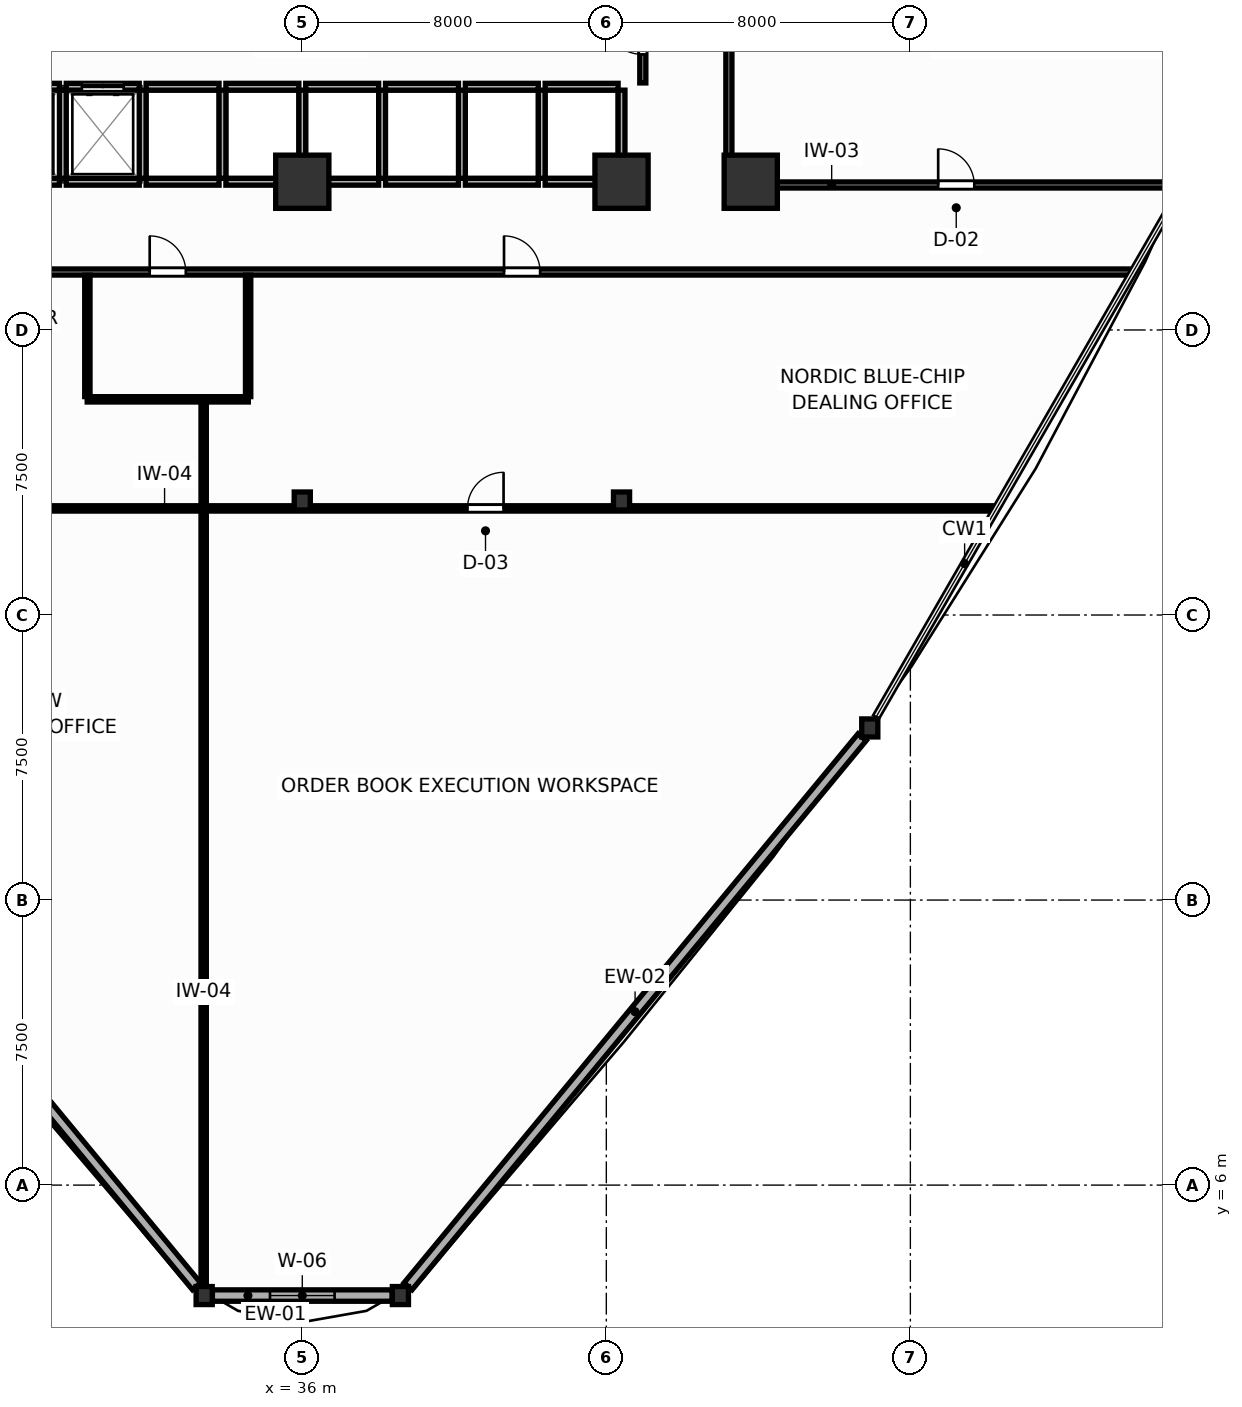
"""IFC4 building model, lengths in metres.
Left out: names, types, materials, properties, quantities, classifications, styles, units other than length and angle.
Written with IfcOpenShell. Run it as: python <this file> out.ifc"""

import sys

from ifc_helpers import new_model, si_unit, direction, frame, frame_2d, origin, origin_2d, place, context, subcontext, project, spatial, rectangle, i_section, extrude, source, transform, mapped, element, fill, save


model = new_model("IFC4")
c1 = context("Model", 3, precision=1e-05, world=origin(), true_north=direction((0.0, 1.0)))
c2 = subcontext(c1, "Body", "Model", "MODEL_VIEW")
j1 = project(units=[si_unit("LENGTHUNIT", "METRE"), si_unit("PLANEANGLEUNIT", "RADIAN")], contexts=[c1])
p1 = place(None, origin())
s1 = spatial("IfcSite", under=j1, at=p1, CompositionType="ELEMENT")
p2 = place(p1, origin())
s2 = spatial("IfcBuilding", under=s1, at=p2, CompositionType="ELEMENT")
p3 = place(p2, frame((0.0, 0.0, 31.8)))
s3 = spatial("IfcBuildingStorey", under=s2, at=p3, CompositionType="ELEMENT", Elevation=31.8)
m1 = source(origin(), c2, "Body", "SweptSolid", [
    extrude(rectangle(XDim=1.4, YDim=1.4, at=origin_2d()), origin(), (0.0, 0.0, 1.0), 3.9),
])
for number, where, z_axis, x_axis in (
    (1, (44.4, 32.4, 0.0), (0.0, 0.0, 1.0), (1.0, 0.0, 0.0)),
    (2, (36.0, 32.4, 0.0), (0.0, 0.0, 1.0), (1.0, 0.0, 0.0)),
    (3, (47.8, 32.4, 0.0), (0.0, 0.0, 1.0), (1.0, 0.0, 0.0)),
):
    element("IfcColumn", number, at=place(p3, frame(where, z_axis=z_axis, x_axis=x_axis)), inside=s3, PredefinedType="COLUMN", context=c2, shape_type="MappedRepresentation", body=[
        mapped(m1, transform((0.0, 0.0, 0.0), scale=1.0)),
    ])
m2 = source(origin(), c2, "Body", "SweptSolid", [
    extrude(i_section(OverallWidth=0.424, OverallDepth=0.474, WebThickness=0.045, FlangeThickness=0.072, FilletRadius=0.015, at=origin_2d()), origin(), (0.0, 0.0, 1.0), 3.9),
])
for number, where, z_axis, x_axis in (
    (4, (44.4, 24.0, 0.0), (0.0, 0.0, 1.0), (1.0, 0.0, 0.0)),
    (5, (36.0, 24.0, 0.0), (0.0, 0.0, 1.0), (1.0, 0.0, 0.0)),
    (6, (33.418, 3.094, 0.0), (0.0, 0.0, 1.0), (1.0, 0.0, 0.0)),
    (7, (38.582, 3.094, 0.0), (0.0, 0.0, 1.0), (1.0, 0.0, 0.0)),
    (8, (50.932, 18.029, 0.0), (0.0, 0.0, 1.0), (1.0, 0.0, 0.0)),
):
    element("IfcColumn", number, at=place(p3, frame(where, z_axis=z_axis, x_axis=x_axis)), inside=s3, PredefinedType="COLUMN", context=c2, shape_type="MappedRepresentation", body=[
        mapped(m2, transform((0.0, 0.0, 0.0), scale=1.0)),
    ])
p4 = place(p3, frame((21.268, 17.787, 0.0), z_axis=(0.0, 0.0, 1.0), x_axis=(0.637262575447, -0.770646747826, 0.0)))
e9 = element("IfcWall", 9, at=p4, inside=s3, PredefinedType="SOLIDWALL", context=c2, shape_type="SweptSolid", body=[
    extrude(rectangle(XDim=18.752, YDim=0.28, at=frame_2d((9.376, 0.0))), origin(), (0.0, 0.0, 1.0), 2.08),
])
p5 = place(p3, frame((33.635, 3.094, 0.0), z_axis=(0.0, 0.0, 1.0), x_axis=(1.0, 0.0, 0.0)))
e10 = element("IfcWall", 10, at=p5, inside=s3, PredefinedType="SOLIDWALL", context=c2, shape_type="SweptSolid", body=[
    extrude(rectangle(XDim=4.73, YDim=0.3, at=frame_2d((2.365, 0.0))), origin(), (0.0, 0.0, 1.0), 2.08),
])
p6 = place(p5, frame((1.515, 0.0, 0.75)))
e11 = element("IfcOpeningElement", 11, at=p6, cuts=e10, PredefinedType="OPENING", context=c2, shape_type="SweptSolid", body=[
    extrude(rectangle(XDim=1.7, YDim=1.15, at=frame_2d((0.85, 0.575))), frame((0.0, 0.16, 0.0), z_axis=(0.0, -1.0, 0.0), x_axis=(1.0, 0.0, 0.0)), (0.0, 0.0, 1.0), 0.32),
])
p7 = place(p3, frame((38.782, 3.336, 0.0), z_axis=(0.0, 0.0, 1.0), x_axis=(0.637262575447, 0.770646747826, 0.0)))
e12 = element("IfcWall", 12, at=p7, inside=s3, PredefinedType="SOLIDWALL", context=c2, shape_type="SweptSolid", body=[
    extrude(rectangle(XDim=18.752, YDim=0.28, at=frame_2d((9.376, 0.0))), origin(), (0.0, 0.0, 1.0), 2.08),
])
p8 = place(p3, frame((27.69, 34.9, 0.0), z_axis=(0.0, 0.0, 1.0), x_axis=(1.0, 0.0, 0.0)))
e13 = element("IfcWall", 13, at=p8, inside=s3, PredefinedType="PARTITIONING", context=c2, shape_type="SweptSolid", body=[
    extrude(rectangle(XDim=1.92, YDim=0.18, at=frame_2d((0.96, 0.0))), origin(), (0.0, 0.0, 1.0), 3.68),
])
p9 = place(p8, frame((0.41, 0.0, 0.0)))
e14 = element("IfcOpeningElement", 14, at=p9, cuts=e13, PredefinedType="OPENING", context=c2, shape_type="SweptSolid", body=[
    extrude(rectangle(XDim=1.1, YDim=2.1, at=frame_2d((0.55, 1.05))), frame((0.0, 0.1, 0.0), z_axis=(0.0, -1.0, 0.0), x_axis=(1.0, 0.0, 0.0)), (0.0, 0.0, 1.0), 0.2),
])
p10 = place(p3, frame((27.69, 32.4, 0.0), z_axis=(0.0, 0.0, 1.0), x_axis=(1.0, 0.0, 0.0)))
e15 = element("IfcWall", 15, at=p10, inside=s3, PredefinedType="PARTITIONING", context=c2, shape_type="SweptSolid", body=[
    extrude(rectangle(XDim=1.92, YDim=0.18, at=frame_2d((0.96, 0.0))), origin(), (0.0, 0.0, 1.0), 2.24),
])
p11 = place(p3, frame((29.79, 34.9, 0.0), z_axis=(0.0, 0.0, 1.0), x_axis=(1.0, 0.0, 0.0)))
e16 = element("IfcWall", 16, at=p11, inside=s3, PredefinedType="PARTITIONING", context=c2, shape_type="SweptSolid", body=[
    extrude(rectangle(XDim=1.92, YDim=0.18, at=frame_2d((0.96, 0.0))), origin(), (0.0, 0.0, 1.0), 3.68),
])
p12 = place(p11, frame((0.41, 0.0, 0.0)))
e17 = element("IfcOpeningElement", 17, at=p12, cuts=e16, PredefinedType="OPENING", context=c2, shape_type="SweptSolid", body=[
    extrude(rectangle(XDim=1.1, YDim=2.1, at=frame_2d((0.55, 1.05))), frame((0.0, 0.1, 0.0), z_axis=(0.0, -1.0, 0.0), x_axis=(1.0, 0.0, 0.0)), (0.0, 0.0, 1.0), 0.2),
])
p13 = place(p3, frame((29.79, 32.4, 0.0), z_axis=(0.0, 0.0, 1.0), x_axis=(1.0, 0.0, 0.0)))
e18 = element("IfcWall", 18, at=p13, inside=s3, PredefinedType="PARTITIONING", context=c2, shape_type="SweptSolid", body=[
    extrude(rectangle(XDim=1.92, YDim=0.18, at=frame_2d((0.96, 0.0))), origin(), (0.0, 0.0, 1.0), 2.24),
])
p14 = place(p3, frame((29.7, 32.49, 0.0), z_axis=(0.0, 0.0, 1.0), x_axis=(0.0, 1.0, 0.0)))
e19 = element("IfcWall", 19, at=p14, inside=s3, PredefinedType="PARTITIONING", context=c2, shape_type="SweptSolid", body=[
    extrude(rectangle(XDim=2.32, YDim=0.18, at=frame_2d((1.16, 0.0))), origin(), (0.0, 0.0, 1.0), 3.68),
])
p15 = place(p3, frame((31.89, 34.9, 0.0), z_axis=(0.0, 0.0, 1.0), x_axis=(1.0, 0.0, 0.0)))
e20 = element("IfcWall", 20, at=p15, inside=s3, PredefinedType="PARTITIONING", context=c2, shape_type="SweptSolid", body=[
    extrude(rectangle(XDim=1.92, YDim=0.18, at=frame_2d((0.96, 0.0))), origin(), (0.0, 0.0, 1.0), 3.68),
])
p16 = place(p3, frame((31.89, 32.4, 0.0), z_axis=(0.0, 0.0, 1.0), x_axis=(1.0, 0.0, 0.0)))
e21 = element("IfcWall", 21, at=p16, inside=s3, PredefinedType="PARTITIONING", context=c2, shape_type="SweptSolid", body=[
    extrude(rectangle(XDim=1.92, YDim=0.18, at=frame_2d((0.96, 0.0))), origin(), (0.0, 0.0, 1.0), 2.24),
])
p17 = place(p3, frame((31.8, 32.49, 0.0), z_axis=(0.0, 0.0, 1.0), x_axis=(0.0, 1.0, 0.0)))
e22 = element("IfcWall", 22, at=p17, inside=s3, PredefinedType="PARTITIONING", context=c2, shape_type="SweptSolid", body=[
    extrude(rectangle(XDim=2.32, YDim=0.18, at=frame_2d((1.16, 0.0))), origin(), (0.0, 0.0, 1.0), 3.68),
])
p18 = place(p3, frame((33.99, 34.9, 0.0), z_axis=(0.0, 0.0, 1.0), x_axis=(1.0, 0.0, 0.0)))
e23 = element("IfcWall", 23, at=p18, inside=s3, PredefinedType="PARTITIONING", context=c2, shape_type="SweptSolid", body=[
    extrude(rectangle(XDim=1.92, YDim=0.18, at=frame_2d((0.96, 0.0))), origin(), (0.0, 0.0, 1.0), 3.68),
])
p19 = place(p3, frame((33.99, 32.4, 0.0), z_axis=(0.0, 0.0, 1.0), x_axis=(1.0, 0.0, 0.0)))
e24 = element("IfcWall", 24, at=p19, inside=s3, PredefinedType="PARTITIONING", context=c2, shape_type="SweptSolid", body=[
    extrude(rectangle(XDim=1.92, YDim=0.18, at=frame_2d((0.96, 0.0))), origin(), (0.0, 0.0, 1.0), 2.24),
])
p20 = place(p3, frame((33.9, 32.49, 0.0), z_axis=(0.0, 0.0, 1.0), x_axis=(0.0, 1.0, 0.0)))
e25 = element("IfcWall", 25, at=p20, inside=s3, PredefinedType="PARTITIONING", context=c2, shape_type="SweptSolid", body=[
    extrude(rectangle(XDim=2.32, YDim=0.18, at=frame_2d((1.16, 0.0))), origin(), (0.0, 0.0, 1.0), 3.68),
])
p21 = place(p3, frame((36.09, 34.9, 0.0), z_axis=(0.0, 0.0, 1.0), x_axis=(1.0, 0.0, 0.0)))
e26 = element("IfcWall", 26, at=p21, inside=s3, PredefinedType="PARTITIONING", context=c2, shape_type="SweptSolid", body=[
    extrude(rectangle(XDim=1.92, YDim=0.18, at=frame_2d((0.96, 0.0))), origin(), (0.0, 0.0, 1.0), 3.68),
])
p22 = place(p3, frame((36.09, 32.4, 0.0), z_axis=(0.0, 0.0, 1.0), x_axis=(1.0, 0.0, 0.0)))
e27 = element("IfcWall", 27, at=p22, inside=s3, PredefinedType="PARTITIONING", context=c2, shape_type="SweptSolid", body=[
    extrude(rectangle(XDim=1.92, YDim=0.18, at=frame_2d((0.96, 0.0))), origin(), (0.0, 0.0, 1.0), 2.24),
])
p23 = place(p3, frame((36.0, 32.49, 0.0), z_axis=(0.0, 0.0, 1.0), x_axis=(0.0, 1.0, 0.0)))
e28 = element("IfcWall", 28, at=p23, inside=s3, PredefinedType="PARTITIONING", context=c2, shape_type="SweptSolid", body=[
    extrude(rectangle(XDim=2.32, YDim=0.18, at=frame_2d((1.16, 0.0))), origin(), (0.0, 0.0, 1.0), 3.68),
])
p24 = place(p3, frame((38.19, 34.9, 0.0), z_axis=(0.0, 0.0, 1.0), x_axis=(1.0, 0.0, 0.0)))
e29 = element("IfcWall", 29, at=p24, inside=s3, PredefinedType="PARTITIONING", context=c2, shape_type="SweptSolid", body=[
    extrude(rectangle(XDim=1.92, YDim=0.18, at=frame_2d((0.96, 0.0))), origin(), (0.0, 0.0, 1.0), 3.68),
])
p25 = place(p3, frame((38.19, 32.4, 0.0), z_axis=(0.0, 0.0, 1.0), x_axis=(1.0, 0.0, 0.0)))
e30 = element("IfcWall", 30, at=p25, inside=s3, PredefinedType="PARTITIONING", context=c2, shape_type="SweptSolid", body=[
    extrude(rectangle(XDim=1.92, YDim=0.18, at=frame_2d((0.96, 0.0))), origin(), (0.0, 0.0, 1.0), 2.24),
])
p26 = place(p3, frame((38.1, 32.49, 0.0), z_axis=(0.0, 0.0, 1.0), x_axis=(0.0, 1.0, 0.0)))
e31 = element("IfcWall", 31, at=p26, inside=s3, PredefinedType="PARTITIONING", context=c2, shape_type="SweptSolid", body=[
    extrude(rectangle(XDim=2.32, YDim=0.18, at=frame_2d((1.16, 0.0))), origin(), (0.0, 0.0, 1.0), 3.68),
])
p27 = place(p3, frame((40.29, 34.9, 0.0), z_axis=(0.0, 0.0, 1.0), x_axis=(1.0, 0.0, 0.0)))
e32 = element("IfcWall", 32, at=p27, inside=s3, PredefinedType="PARTITIONING", context=c2, shape_type="SweptSolid", body=[
    extrude(rectangle(XDim=1.92, YDim=0.18, at=frame_2d((0.96, 0.0))), origin(), (0.0, 0.0, 1.0), 3.68),
])
p28 = place(p3, frame((40.29, 32.4, 0.0), z_axis=(0.0, 0.0, 1.0), x_axis=(1.0, 0.0, 0.0)))
e33 = element("IfcWall", 33, at=p28, inside=s3, PredefinedType="PARTITIONING", context=c2, shape_type="SweptSolid", body=[
    extrude(rectangle(XDim=1.92, YDim=0.18, at=frame_2d((0.96, 0.0))), origin(), (0.0, 0.0, 1.0), 2.24),
])
p29 = place(p3, frame((40.2, 32.49, 0.0), z_axis=(0.0, 0.0, 1.0), x_axis=(0.0, 1.0, 0.0)))
e34 = element("IfcWall", 34, at=p29, inside=s3, PredefinedType="PARTITIONING", context=c2, shape_type="SweptSolid", body=[
    extrude(rectangle(XDim=2.32, YDim=0.18, at=frame_2d((1.16, 0.0))), origin(), (0.0, 0.0, 1.0), 3.68),
])
p30 = place(p3, frame((42.39, 34.9, 0.0), z_axis=(0.0, 0.0, 1.0), x_axis=(1.0, 0.0, 0.0)))
e35 = element("IfcWall", 35, at=p30, inside=s3, PredefinedType="PARTITIONING", context=c2, shape_type="SweptSolid", body=[
    extrude(rectangle(XDim=1.92, YDim=0.18, at=frame_2d((0.96, 0.0))), origin(), (0.0, 0.0, 1.0), 3.68),
])
p31 = place(p3, frame((42.39, 32.4, 0.0), z_axis=(0.0, 0.0, 1.0), x_axis=(1.0, 0.0, 0.0)))
e36 = element("IfcWall", 36, at=p31, inside=s3, PredefinedType="PARTITIONING", context=c2, shape_type="SweptSolid", body=[
    extrude(rectangle(XDim=1.92, YDim=0.18, at=frame_2d((0.96, 0.0))), origin(), (0.0, 0.0, 1.0), 2.24),
])
for number, where, z_axis, x_axis in (
    (37, (42.3, 32.49, 0.0), (0.0, 0.0, 1.0), (0.0, 1.0, 0.0)),
    (38, (44.4, 32.49, 0.0), (0.0, 0.0, 1.0), (0.0, 1.0, 0.0)),
):
    element("IfcWall", number, at=place(p3, frame(where, z_axis=z_axis, x_axis=x_axis)), inside=s3, PredefinedType="PARTITIONING", context=c2, shape_type="SweptSolid", body=[
        extrude(rectangle(XDim=2.32, YDim=0.18, at=frame_2d((1.16, 0.0))), origin(), (0.0, 0.0, 1.0), 3.68),
    ])
p32 = place(p3, frame((44.96, 35.0, 0.0), z_axis=(0.0, 0.0, 1.0), x_axis=(0.0, 1.0, 0.0)))
e39 = element("IfcWall", 39, at=p32, inside=s3, PredefinedType="PARTITIONING", context=c2, shape_type="SweptSolid", body=[
    extrude(rectangle(XDim=2.65, YDim=0.16, at=frame_2d((1.325, 0.0))), origin(), (0.0, 0.0, 1.0), 3.68),
])
p33 = place(p32, frame((0.75, 0.0, 0.0)))
e40 = element("IfcOpeningElement", 40, at=p33, cuts=e39, PredefinedType="OPENING", context=c2, shape_type="SweptSolid", body=[
    extrude(rectangle(XDim=1.05, YDim=2.1, at=frame_2d((0.525, 1.05))), frame((0.0, 0.09, 0.0), z_axis=(0.0, -1.0, 0.0), x_axis=(1.0, 0.0, 0.0)), (0.0, 0.0, 1.0), 0.18),
])
p34 = place(p3, frame((14.162, 30.025, 0.0), z_axis=(0.0, 0.0, 1.0), x_axis=(1.0, 0.0, 0.0)))
e41 = element("IfcWall", 41, at=p34, inside=s3, PredefinedType="PARTITIONING", context=c2, shape_type="SweptSolid", body=[
    extrude(rectangle(XDim=43.676, YDim=0.16, at=frame_2d((21.838, 0.0))), origin(), (0.0, 0.0, 1.0), 3.68),
])
p35 = place(p34, frame((17.823, 0.0, 0.0)))
e42 = element("IfcOpeningElement", 42, at=p35, cuts=e41, PredefinedType="OPENING", context=c2, shape_type="SweptSolid", body=[
    extrude(rectangle(XDim=0.95, YDim=2.05, at=frame_2d((0.475, 1.025))), frame((0.0, 0.09, 0.0), z_axis=(0.0, -1.0, 0.0), x_axis=(1.0, 0.0, 0.0)), (0.0, 0.0, 1.0), 0.18),
])
p36 = place(p34, frame((6.824, 0.0, 0.0)))
e43 = element("IfcOpeningElement", 43, at=p36, cuts=e41, PredefinedType="OPENING", context=c2, shape_type="SweptSolid", body=[
    extrude(rectangle(XDim=0.95, YDim=2.05, at=frame_2d((0.475, 1.025))), frame((0.0, 0.09, 0.0), z_axis=(0.0, -1.0, 0.0), x_axis=(1.0, 0.0, 0.0)), (0.0, 0.0, 1.0), 0.18),
])
p37 = place(p34, frame((27.146, 0.0, 0.0)))
e44 = element("IfcOpeningElement", 44, at=p37, cuts=e41, PredefinedType="OPENING", context=c2, shape_type="SweptSolid", body=[
    extrude(rectangle(XDim=0.95, YDim=2.05, at=frame_2d((0.475, 1.025))), frame((0.0, 0.09, 0.0), z_axis=(0.0, -1.0, 0.0), x_axis=(1.0, 0.0, 0.0)), (0.0, 0.0, 1.0), 0.18),
])
p38 = place(p3, frame((47.225, 32.31, 0.0), z_axis=(0.0, 0.0, 1.0), x_axis=(0.0, 1.0, 0.0)))
e45 = element("IfcWall", 45, at=p38, inside=s3, PredefinedType="PARTITIONING", context=c2, shape_type="SweptSolid", body=[
    extrude(rectangle(XDim=25.059, YDim=0.16, at=frame_2d((12.529, 0.0))), origin(), (0.0, 0.0, 1.0), 3.68),
])
p39 = place(p38, frame((17.287, 0.0, 0.0)))
e46 = element("IfcOpeningElement", 46, at=p39, cuts=e45, PredefinedType="OPENING", context=c2, shape_type="SweptSolid", body=[
    extrude(rectangle(XDim=0.95, YDim=2.05, at=frame_2d((0.475, 1.025))), frame((0.0, 0.09, 0.0), z_axis=(0.0, -1.0, 0.0), x_axis=(1.0, 0.0, 0.0)), (0.0, 0.0, 1.0), 0.18),
])
p40 = place(p3, frame((47.307, 32.315, 0.0), z_axis=(0.0, 0.0, 1.0), x_axis=(1.0, 0.0, 0.0)))
e47 = element("IfcWall", 47, at=p40, inside=s3, PredefinedType="PARTITIONING", context=c2, shape_type="SweptSolid", body=[
    extrude(rectangle(XDim=11.8, YDim=0.16, at=frame_2d((5.9, 0.0))), origin(), (0.0, 0.0, 1.0), 2.24),
])
p41 = place(p40, frame((5.425, 0.0, 0.0)))
e48 = element("IfcOpeningElement", 48, at=p41, cuts=e47, PredefinedType="OPENING", context=c2, shape_type="SweptSolid", body=[
    extrude(rectangle(XDim=0.95, YDim=2.05, at=frame_2d((0.475, 1.025))), frame((0.0, 0.09, 0.0), z_axis=(0.0, -1.0, 0.0), x_axis=(1.0, 0.0, 0.0)), (0.0, 0.0, 1.0), 0.18),
])
p42 = place(p3, frame((17.753, 23.805, 0.0), z_axis=(0.0, 0.0, 1.0), x_axis=(1.0, 0.0, 0.0)))
e49 = element("IfcWall", 49, at=p42, inside=s3, PredefinedType="PARTITIONING", context=c2, shape_type="SweptSolid", body=[
    extrude(rectangle(XDim=36.494, YDim=0.14, at=frame_2d((18.247, 0.0))), origin(), (0.0, 0.0, 1.0), 2.24),
])
p43 = place(p42, frame((5.704, 0.0, 0.0)))
e50 = element("IfcOpeningElement", 50, at=p43, cuts=e49, PredefinedType="OPENING", context=c2, shape_type="SweptSolid", body=[
    extrude(rectangle(XDim=0.95, YDim=2.05, at=frame_2d((0.475, 1.025))), frame((0.0, 0.08, 0.0), z_axis=(0.0, -1.0, 0.0), x_axis=(1.0, 0.0, 0.0)), (0.0, 0.0, 1.0), 0.16),
])
p44 = place(p42, frame((22.593, 0.0, 0.0)))
e51 = element("IfcOpeningElement", 51, at=p44, cuts=e49, PredefinedType="OPENING", context=c2, shape_type="SweptSolid", body=[
    extrude(rectangle(XDim=0.95, YDim=2.05, at=frame_2d((0.475, 1.025))), frame((0.0, 0.08, 0.0), z_axis=(0.0, -1.0, 0.0), x_axis=(1.0, 0.0, 0.0)), (0.0, 0.0, 1.0), 0.16),
])
p45 = place(p3, frame((33.405, 3.129, 0.0), z_axis=(0.0, 0.0, 1.0), x_axis=(0.0, 1.0, 0.0)))
e52 = element("IfcWall", 52, at=p45, inside=s3, PredefinedType="PARTITIONING", context=c2, shape_type="SweptSolid", body=[
    extrude(rectangle(XDim=23.561, YDim=0.14, at=frame_2d((11.78, 0.0))), origin(), (0.0, 0.0, 1.0), 2.24),
])
p46 = place(p3, frame((30.34, 26.675, 0.0), z_axis=(0.0, 0.0, 1.0), x_axis=(1.0, 0.0, 0.0)))
e53 = element("IfcWall", 53, at=p46, inside=s3, PredefinedType="PARTITIONING", context=c2, shape_type="SweptSolid", body=[
    extrude(rectangle(XDim=4.24, YDim=0.14, at=frame_2d((2.12, 0.0))), origin(), (0.0, 0.0, 1.0), 3.68),
])
for number, where, z_axis, x_axis in (
    (54, (30.345, 26.747, 0.0), (0.0, 0.0, 1.0), (0.0, 1.0, 0.0)),
    (55, (34.575, 26.747, 0.0), (0.0, 0.0, 1.0), (0.0, 1.0, 0.0)),
):
    element("IfcWall", number, at=place(p3, frame(where, z_axis=z_axis, x_axis=x_axis)), inside=s3, PredefinedType="PARTITIONING", context=c2, shape_type="SweptSolid", body=[
        extrude(rectangle(XDim=3.196, YDim=0.14, at=frame_2d((1.598, 0.0))), origin(), (0.0, 0.0, 1.0), 3.68),
    ])
p47 = place(p6, origin())
e56 = element("IfcWindow", 56, at=p47, inside=s3, PartitioningType="SINGLE_PANEL", PredefinedType="WINDOW", context=c2, shape_type="SweptSolid", body=[
    extrude(rectangle(XDim=1.7, YDim=1.15, at=frame_2d((0.85, 0.575))), frame((0.0, 0.03, 0.0), z_axis=(0.0, -1.0, 0.0), x_axis=(1.0, 0.0, 0.0)), (0.0, 0.0, 1.0), 0.06),
])
fill(e11, e56)
p48 = place(p12, origin())
e57 = element("IfcDoor", 57, at=p48, inside=s3, OperationType="DOUBLE_DOOR_SLIDING", PredefinedType="DOOR", context=c2, shape_type="SweptSolid", body=[
    extrude(rectangle(XDim=1.1, YDim=2.1, at=frame_2d((0.55, 1.05))), frame((0.0, 0.025, 0.0), z_axis=(0.0, -1.0, 0.0), x_axis=(1.0, 0.0, 0.0)), (0.0, 0.0, 1.0), 0.05),
])
fill(e17, e57)
p49 = place(p33, origin())
e58 = element("IfcDoor", 58, at=p49, inside=s3, OperationType="SINGLE_SWING_RIGHT", PredefinedType="DOOR", context=c2, shape_type="SweptSolid", body=[
    extrude(rectangle(XDim=1.05, YDim=2.1, at=frame_2d((0.525, 1.05))), frame((0.0, 0.025, 0.0), z_axis=(0.0, -1.0, 0.0), x_axis=(1.0, 0.0, 0.0)), (0.0, 0.0, 1.0), 0.05),
])
fill(e40, e58)
p50 = place(p35, origin())
e59 = element("IfcDoor", 59, at=p50, inside=s3, OperationType="SINGLE_SWING_LEFT", PredefinedType="DOOR", context=c2, shape_type="SweptSolid", body=[
    extrude(rectangle(XDim=0.95, YDim=2.05, at=frame_2d((0.475, 1.025))), frame((0.0, 0.025, 0.0), z_axis=(0.0, -1.0, 0.0), x_axis=(1.0, 0.0, 0.0)), (0.0, 0.0, 1.0), 0.05),
])
fill(e42, e59)
p51 = place(p37, origin())
e60 = element("IfcDoor", 60, at=p51, inside=s3, OperationType="SINGLE_SWING_LEFT", PredefinedType="DOOR", context=c2, shape_type="SweptSolid", body=[
    extrude(rectangle(XDim=0.95, YDim=2.05, at=frame_2d((0.475, 1.025))), frame((0.0, 0.025, 0.0), z_axis=(0.0, -1.0, 0.0), x_axis=(1.0, 0.0, 0.0)), (0.0, 0.0, 1.0), 0.05),
])
fill(e44, e60)
p52 = place(p41, origin())
e61 = element("IfcDoor", 61, at=p52, inside=s3, OperationType="SINGLE_SWING_LEFT", PredefinedType="DOOR", context=c2, shape_type="SweptSolid", body=[
    extrude(rectangle(XDim=0.95, YDim=2.05, at=frame_2d((0.475, 1.025))), frame((0.0, 0.025, 0.0), z_axis=(0.0, -1.0, 0.0), x_axis=(1.0, 0.0, 0.0)), (0.0, 0.0, 1.0), 0.05),
])
fill(e48, e61)
p53 = place(p44, origin())
e62 = element("IfcDoor", 62, at=p53, inside=s3, OperationType="SINGLE_SWING_RIGHT", PredefinedType="DOOR", context=c2, shape_type="SweptSolid", body=[
    extrude(rectangle(XDim=0.95, YDim=2.05, at=frame_2d((0.475, 1.025))), frame((0.0, 0.025, 0.0), z_axis=(0.0, -1.0, 0.0), x_axis=(1.0, 0.0, 0.0)), (0.0, 0.0, 1.0), 0.05),
])
fill(e51, e62)
save(model, sys.argv[1])
